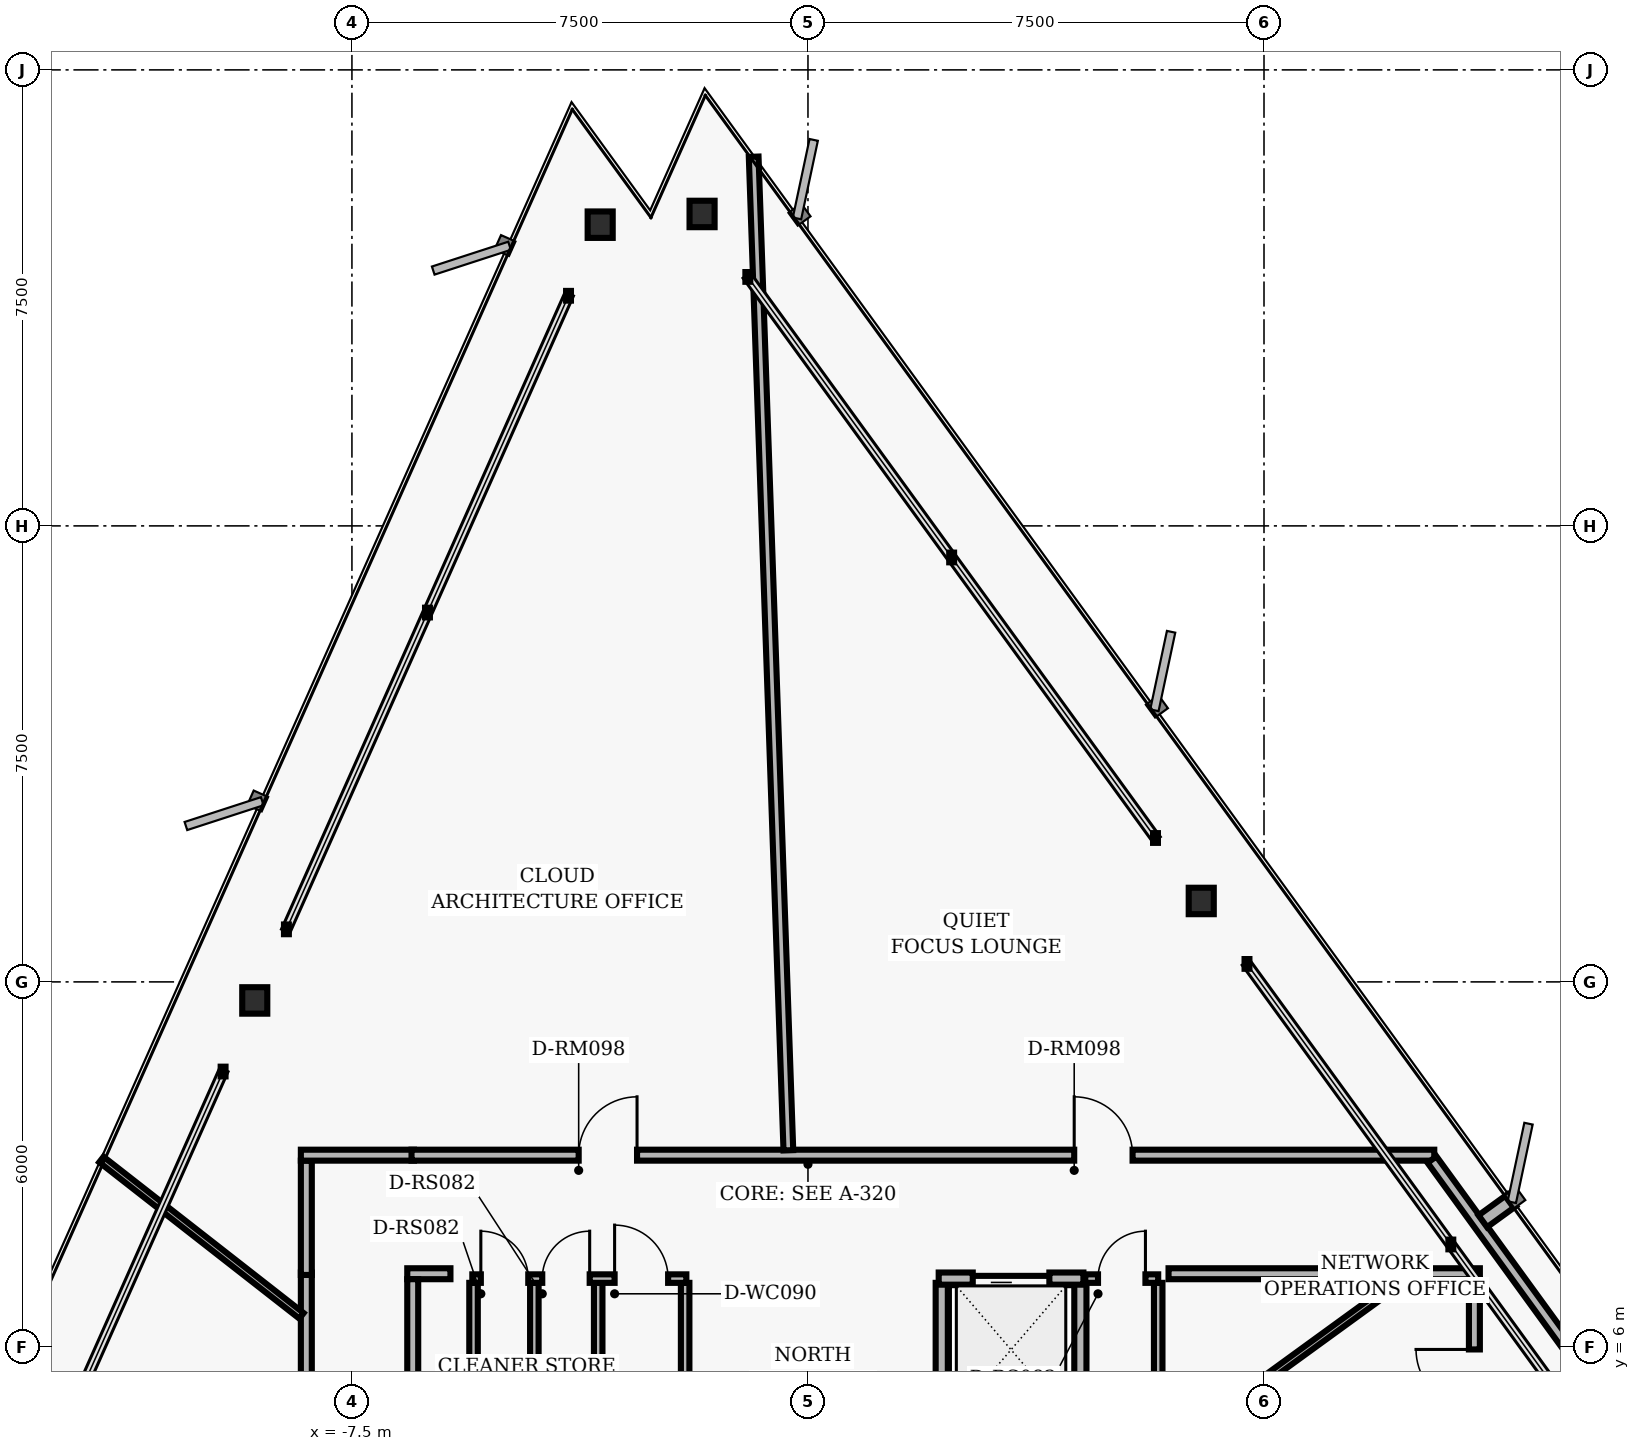
"""IFC4 building model, lengths in metres.
Left out: names, types, materials, properties, quantities, classifications, styles, units other than length and angle.
Written with IfcOpenShell. Run it as: python <this file> out.ifc"""

import sys

from ifc_helpers import new_model, si_unit, direction, frame, frame_2d, origin, origin_2d, place, context, subcontext, project, spatial, rectangle, i_section, extrude, element, fill, save


model = new_model("IFC4")
c1 = context("Model", 3, precision=1e-05, world=origin(), true_north=direction((0.0, 1.0)))
c2 = subcontext(c1, "Body", "Model", "MODEL_VIEW")
j1 = project(units=[si_unit("LENGTHUNIT", "METRE"), si_unit("PLANEANGLEUNIT", "RADIAN")], contexts=[c1])
p1 = place(None, origin())
s1 = spatial("IfcSite", under=j1, at=p1, CompositionType="ELEMENT")
p2 = place(p1, origin())
s2 = spatial("IfcBuilding", under=s1, at=p2, CompositionType="ELEMENT")
p3 = place(p2, frame((0.0, 0.0, 107.68)))
s3 = spatial("IfcBuildingStorey", under=s2, at=p3, CompositionType="ELEMENT", Elevation=107.68)
for number, where, z_axis, x_axis in (
    (1, (6.468, 13.331, 0.0), (0.0, 0.0, 1.0), (1.0, 0.0, 0.0)),
    (2, (-1.742, 24.63, 0.0), (0.0, 0.0, 1.0), (1.0, 0.0, 0.0)),
    (3, (-3.417, 24.454, 0.0), (0.0, 0.0, 1.0), (1.0, 0.0, 0.0)),
    (4, (-9.098, 11.695, 0.0), (0.0, 0.0, 1.0), (1.0, 0.0, 0.0)),
):
    element("IfcColumn", number, at=place(p3, frame(where, z_axis=z_axis, x_axis=x_axis)), inside=s3, PredefinedType="COLUMN", context=c2, shape_type="SweptSolid", body=[
        extrude(i_section(OverallWidth=0.412, OverallDepth=0.435, WebThickness=0.036, FlangeThickness=0.057, FilletRadius=0.022, at=origin_2d()), origin(), (0.0, 0.0, 1.0), 3.04),
    ])
p4 = place(p3, frame((2.2, 4.95, 0.0), z_axis=(0.0, 0.0, 1.0), x_axis=(0.0, 1.0, 0.0)))
e5 = element("IfcWall", 5, at=p4, inside=s3, PredefinedType="PARTITIONING", context=c2, shape_type="SweptSolid", body=[
    extrude(rectangle(XDim=2.1, YDim=0.2, at=frame_2d((1.05, 0.0))), origin(), (0.0, 0.0, 1.0), 2.132),
])
p5 = place(p3, frame((4.48, 4.95, 0.0), z_axis=(0.0, 0.0, 1.0), x_axis=(0.0, 1.0, 0.0)))
e6 = element("IfcWall", 6, at=p5, inside=s3, PredefinedType="PARTITIONING", context=c2, shape_type="SweptSolid", body=[
    extrude(rectangle(XDim=2.1, YDim=0.2, at=frame_2d((1.05, 0.0))), origin(), (0.0, 0.0, 1.0), 2.763),
])
p6 = place(p3, frame((2.15, 7.12, 0.0), z_axis=(0.0, 0.0, 1.0), x_axis=(1.0, 0.0, 0.0)))
e7 = element("IfcWall", 7, at=p6, inside=s3, PredefinedType="PARTITIONING", context=c2, shape_type="SweptSolid", body=[
    extrude(rectangle(XDim=2.38, YDim=0.2, at=frame_2d((1.19, 0.0))), origin(), (0.0, 0.0, 1.0), 2.763),
])
p7 = place(p6, frame((0.56, 0.0, 0.0)))
e8 = element("IfcOpeningElement", 8, at=p7, cuts=e7, PredefinedType="OPENING", context=c2, shape_type="SweptSolid", body=[
    extrude(rectangle(XDim=1.26, YDim=2.06, at=frame_2d((0.63, 1.03))), frame((0.0, 0.11, 0.0), z_axis=(0.0, -1.0, 0.0), x_axis=(1.0, 0.0, 0.0)), (0.0, 0.0, 1.0), 0.22),
])
for number, where, z_axis, x_axis in (
    (9, (-5.5, 4.95, 0.0), (0.0, 0.0, 1.0), (0.0, 1.0, 0.0)),
    (10, (-4.5, 4.95, 0.0), (0.0, 0.0, 1.0), (0.0, 1.0, 0.0)),
    (11, (-3.45, 4.95, 0.0), (0.0, 0.0, 1.0), (0.0, 1.0, 0.0)),
    (12, (-2.02, 4.95, 0.0), (0.0, 0.0, 1.0), (0.0, 1.0, 0.0)),
):
    element("IfcWall", number, at=place(p3, frame(where, z_axis=z_axis, x_axis=x_axis)), inside=s3, PredefinedType="PARTITIONING", context=c2, shape_type="SweptSolid", body=[
        extrude(rectangle(XDim=2.1, YDim=0.14, at=frame_2d((1.05, 0.0))), origin(), (0.0, 0.0, 1.0), 2.763),
    ])
p8 = place(p3, frame((-5.52, 7.12, 0.0), z_axis=(0.0, 0.0, 1.0), x_axis=(1.0, 0.0, 0.0)))
e13 = element("IfcWall", 13, at=p8, inside=s3, PredefinedType="PARTITIONING", context=c2, shape_type="SweptSolid", body=[
    extrude(rectangle(XDim=3.52, YDim=0.14, at=frame_2d((1.76, 0.0))), origin(), (0.0, 0.0, 1.0), 2.763),
])
p9 = place(p8, frame((0.14, 0.0, 0.0)))
e14 = element("IfcOpeningElement", 14, at=p9, cuts=e13, PredefinedType="OPENING", context=c2, shape_type="SweptSolid", body=[
    extrude(rectangle(XDim=0.78, YDim=2.01, at=frame_2d((0.39, 1.005))), frame((0.0, 0.08, 0.0), z_axis=(0.0, -1.0, 0.0), x_axis=(1.0, 0.0, 0.0)), (0.0, 0.0, 1.0), 0.16),
])
p10 = place(p8, frame((1.15, 0.0, 0.0)))
e15 = element("IfcOpeningElement", 15, at=p10, cuts=e13, PredefinedType="OPENING", context=c2, shape_type="SweptSolid", body=[
    extrude(rectangle(XDim=0.78, YDim=2.01, at=frame_2d((0.39, 1.005))), frame((0.0, 0.08, 0.0), z_axis=(0.0, -1.0, 0.0), x_axis=(1.0, 0.0, 0.0)), (0.0, 0.0, 1.0), 0.16),
])
p11 = place(p8, frame((2.34, 0.0, 0.0)))
e16 = element("IfcOpeningElement", 16, at=p11, cuts=e13, PredefinedType="OPENING", context=c2, shape_type="SweptSolid", body=[
    extrude(rectangle(XDim=0.88, YDim=2.02, at=frame_2d((0.44, 1.01))), frame((0.0, 0.08, 0.0), z_axis=(0.0, -1.0, 0.0), x_axis=(1.0, 0.0, 0.0)), (0.0, 0.0, 1.0), 0.16),
])
p12 = place(p3, frame((5.76, 4.95, 0.0), z_axis=(0.0, 0.0, 1.0), x_axis=(0.0, 1.0, 0.0)))
e17 = element("IfcWall", 17, at=p12, inside=s3, PredefinedType="PARTITIONING", context=c2, shape_type="SweptSolid", body=[
    extrude(rectangle(XDim=2.1, YDim=0.14, at=frame_2d((1.05, 0.0))), origin(), (0.0, 0.0, 1.0), 2.132),
])
p13 = place(p3, frame((4.56, 7.12, 0.0), z_axis=(0.0, 0.0, 1.0), x_axis=(1.0, 0.0, 0.0)))
e18 = element("IfcWall", 18, at=p13, inside=s3, PredefinedType="PARTITIONING", context=c2, shape_type="SweptSolid", body=[
    extrude(rectangle(XDim=1.2, YDim=0.14, at=frame_2d((0.6, 0.0))), origin(), (0.0, 0.0, 1.0), 2.763),
])
p14 = place(p13, frame((0.21, 0.0, 0.0)))
e19 = element("IfcOpeningElement", 19, at=p14, cuts=e18, PredefinedType="OPENING", context=c2, shape_type="SweptSolid", body=[
    extrude(rectangle(XDim=0.78, YDim=2.01, at=frame_2d((0.39, 1.005))), frame((0.0, 0.08, 0.0), z_axis=(0.0, -1.0, 0.0), x_axis=(1.0, 0.0, 0.0)), (0.0, 0.0, 1.0), 0.16),
])
p15 = place(p3, frame((-8.25, -7.22, 0.0), z_axis=(0.0, 0.0, 1.0), x_axis=(0.0, 1.0, 0.0)))
e20 = element("IfcWall", 20, at=p15, inside=s3, PredefinedType="PARTITIONING", context=c2, shape_type="SweptSolid", body=[
    extrude(rectangle(XDim=14.44, YDim=0.18, at=frame_2d((7.22, 0.0))), origin(), (0.0, 0.0, 1.0), 2.33),
])
p16 = place(p15, frame((3.038, 0.0, 0.0)))
e21 = element("IfcOpeningElement", 21, at=p16, cuts=e20, PredefinedType="OPENING", context=c2, shape_type="SweptSolid", body=[
    extrude(rectangle(XDim=0.96, YDim=2.02, at=frame_2d((0.48, 1.01))), frame((0.0, 0.1, 0.0), z_axis=(0.0, -1.0, 0.0), x_axis=(1.0, 0.0, 0.0)), (0.0, 0.0, 1.0), 0.2),
])
p17 = place(p15, frame((9.456, 0.0, 0.0)))
e22 = element("IfcOpeningElement", 22, at=p17, cuts=e20, PredefinedType="OPENING", context=c2, shape_type="SweptSolid", body=[
    extrude(rectangle(XDim=1.18, YDim=2.02, at=frame_2d((0.59, 1.01))), frame((0.0, 0.1, 0.0), z_axis=(0.0, -1.0, 0.0), x_axis=(1.0, 0.0, 0.0)), (0.0, 0.0, 1.0), 0.2),
])
p18 = place(p3, frame((-8.25, 7.18, 0.0), z_axis=(0.0, 0.0, 1.0), x_axis=(0.0, 1.0, 0.0)))
e23 = element("IfcWall", 23, at=p18, inside=s3, PredefinedType="PARTITIONING", context=c2, shape_type="SweptSolid", body=[
    extrude(rectangle(XDim=1.88, YDim=0.18, at=frame_2d((0.94, 0.0))), origin(), (0.0, 0.0, 1.0), 2.763),
])
p19 = place(p3, frame((-8.34, 9.15, 0.0), z_axis=(0.0, 0.0, 1.0), x_axis=(1.0, 0.0, 0.0)))
e24 = element("IfcWall", 24, at=p19, inside=s3, PredefinedType="PARTITIONING", context=c2, shape_type="SweptSolid", body=[
    extrude(rectangle(XDim=1.86, YDim=0.18, at=frame_2d((0.93, 0.0))), origin(), (0.0, 0.0, 1.0), 2.763),
])
p20 = place(p3, frame((-6.52, 9.15, 0.0), z_axis=(0.0, 0.0, 1.0), x_axis=(1.0, 0.0, 0.0)))
e25 = element("IfcWall", 25, at=p20, inside=s3, PredefinedType="PARTITIONING", context=c2, shape_type="SweptSolid", body=[
    extrude(rectangle(XDim=16.82, YDim=0.18, at=frame_2d((8.41, 0.0))), origin(), (0.0, 0.0, 1.0), 2.763),
])
p21 = place(p20, frame((10.898, 0.0, 0.0)))
e26 = element("IfcOpeningElement", 26, at=p21, cuts=e25, PredefinedType="OPENING", context=c2, shape_type="SweptSolid", body=[
    extrude(rectangle(XDim=0.96, YDim=2.02, at=frame_2d((0.48, 1.01))), frame((0.0, 0.1, 0.0), z_axis=(0.0, -1.0, 0.0), x_axis=(1.0, 0.0, 0.0)), (0.0, 0.0, 1.0), 0.2),
])
p22 = place(p20, frame((2.749, 0.0, 0.0)))
e27 = element("IfcOpeningElement", 27, at=p22, cuts=e25, PredefinedType="OPENING", context=c2, shape_type="SweptSolid", body=[
    extrude(rectangle(XDim=0.96, YDim=2.02, at=frame_2d((0.48, 1.01))), frame((0.0, 0.1, 0.0), z_axis=(0.0, -1.0, 0.0), x_axis=(1.0, 0.0, 0.0)), (0.0, 0.0, 1.0), 0.2),
])
p23 = place(p3, frame((10.263, 9.077, 0.0), z_axis=(0.0, 0.0, 1.0), x_axis=(0.587780951295, -0.809020119215, 0.0)))
e28 = element("IfcWall", 28, at=p23, inside=s3, PredefinedType="PARTITIONING", context=c2, shape_type="SweptSolid", body=[
    extrude(rectangle(XDim=7.469, YDim=0.18, at=frame_2d((3.734, 0.0))), origin(), (0.0, 0.0, 1.0), 2.763),
])
p24 = place(p3, frame((10.96, 3.84, 0.0), z_axis=(0.0, 0.0, 1.0), x_axis=(0.0, 1.0, 0.0)))
e29 = element("IfcWall", 29, at=p24, inside=s3, PredefinedType="PARTITIONING", context=c2, shape_type="SweptSolid", body=[
    extrude(rectangle(XDim=3.271, YDim=0.18, at=frame_2d((1.635, 0.0))), origin(), (0.0, 0.0, 1.0), 2.763),
])
p25 = place(p24, frame((1.155, 0.0, 0.0)))
e30 = element("IfcOpeningElement", 30, at=p25, cuts=e29, PredefinedType="OPENING", context=c2, shape_type="SweptSolid", body=[
    extrude(rectangle(XDim=0.96, YDim=2.02, at=frame_2d((0.48, 1.01))), frame((0.0, 0.1, 0.0), z_axis=(0.0, -1.0, 0.0), x_axis=(1.0, 0.0, 0.0)), (0.0, 0.0, 1.0), 0.2),
])
p26 = place(p3, frame((11.05, 7.2, 0.0), z_axis=(0.0, 0.0, 1.0), x_axis=(-1.0, 0.0, 0.0)))
e31 = element("IfcWall", 31, at=p26, inside=s3, PredefinedType="PARTITIONING", context=c2, shape_type="SweptSolid", body=[
    extrude(rectangle(XDim=5.12, YDim=0.18, at=frame_2d((2.56, 0.0))), origin(), (0.0, 0.0, 1.0), 2.763),
])
p27 = place(p3, frame((-5.88, 7.2, 0.0), z_axis=(0.0, 0.0, 1.0), x_axis=(-1.0, 0.0, 0.0)))
e32 = element("IfcWall", 32, at=p27, inside=s3, PredefinedType="PARTITIONING", context=c2, shape_type="SweptSolid", body=[
    extrude(rectangle(XDim=0.71, YDim=0.18, at=frame_2d((0.355, 0.0))), origin(), (0.0, 0.0, 1.0), 2.763),
])
p28 = place(p3, frame((-6.5, 7.11, 0.0), z_axis=(0.0, 0.0, 1.0), x_axis=(0.0, -1.0, 0.0)))
e33 = element("IfcWall", 33, at=p28, inside=s3, PredefinedType="PARTITIONING", context=c2, shape_type="SweptSolid", body=[
    extrude(rectangle(XDim=2.058, YDim=0.18, at=frame_2d((1.029, 0.0))), origin(), (0.0, 0.0, 1.0), 2.763),
])
p29 = place(p3, frame((6.758, 4.91, 0.0), z_axis=(0.0, 0.0, 1.0), x_axis=(0.808985911181, 0.58782803226, 0.0)))
e34 = element("IfcWall", 34, at=p29, inside=s3, PredefinedType="MOVABLE", context=c2, shape_type="SweptSolid", body=[
    extrude(rectangle(XDim=3.76, YDim=0.115, at=frame_2d((1.88, 0.0))), origin(), (0.0, 0.0, 1.0), 2.763),
])
p30 = place(p3, frame((11.098, 8.063, 0.0), z_axis=(0.0, 0.0, 1.0), x_axis=(0.809093866449, 0.587679432408, 0.0)))
e35 = element("IfcWall", 35, at=p30, inside=s3, PredefinedType="PARTITIONING", context=c2, shape_type="SweptSolid", body=[
    extrude(rectangle(XDim=0.59, YDim=0.24, at=frame_2d((0.295, 0.0))), origin(), (0.0, 0.0, 1.0), 2.763),
])
p31 = place(p3, frame((-0.322, 9.23, 0.0), z_axis=(0.0, 0.0, 1.0), x_axis=(-0.034907078812, 0.999390562217, 0.0)))
e36 = element("IfcWall", 36, at=p31, inside=s3, PredefinedType="PARTITIONING", context=c2, shape_type="SweptSolid", body=[
    extrude(rectangle(XDim=16.352, YDim=0.16, at=frame_2d((8.176, 0.0))), origin(), (0.0, 0.0, 1.0), 2.132),
])
p32 = place(p3, frame((-8.33, 6.508, 0.0), z_axis=(0.0, 0.0, 1.0), x_axis=(-0.787993347372, 0.615683753641, 0.0)))
e37 = element("IfcWall", 37, at=p32, inside=s3, PredefinedType="MOVABLE", context=c2, shape_type="SweptSolid", body=[
    extrude(rectangle(XDim=4.176, YDim=0.115, at=frame_2d((2.088, 0.0))), origin(), (0.0, 0.0, 1.0), 2.763),
])
p33 = place(p7, origin())
e38 = element("IfcDoor", 38, at=p33, inside=s3, OperationType="SLIDING_TO_LEFT", PredefinedType="DOOR", context=c2, shape_type="SweptSolid", body=[
    extrude(rectangle(XDim=1.26, YDim=2.06, at=frame_2d((0.63, 1.03))), frame((0.0, 0.025, 0.0), z_axis=(0.0, -1.0, 0.0), x_axis=(1.0, 0.0, 0.0)), (0.0, 0.0, 1.0), 0.05),
])
fill(e8, e38)
p34 = place(p9, origin())
e39 = element("IfcDoor", 39, at=p34, inside=s3, OperationType="SINGLE_SWING_LEFT", PredefinedType="DOOR", context=c2, shape_type="SweptSolid", body=[
    extrude(rectangle(XDim=0.78, YDim=2.01, at=frame_2d((0.39, 1.005))), frame((0.0, 0.025, 0.0), z_axis=(0.0, -1.0, 0.0), x_axis=(1.0, 0.0, 0.0)), (0.0, 0.0, 1.0), 0.05),
])
fill(e14, e39)
p35 = place(p10, origin())
e40 = element("IfcDoor", 40, at=p35, inside=s3, OperationType="SINGLE_SWING_RIGHT", PredefinedType="DOOR", context=c2, shape_type="SweptSolid", body=[
    extrude(rectangle(XDim=0.78, YDim=2.01, at=frame_2d((0.39, 1.005))), frame((0.0, 0.025, 0.0), z_axis=(0.0, -1.0, 0.0), x_axis=(1.0, 0.0, 0.0)), (0.0, 0.0, 1.0), 0.05),
])
fill(e15, e40)
p36 = place(p11, origin())
e41 = element("IfcDoor", 41, at=p36, inside=s3, OperationType="SINGLE_SWING_LEFT", PredefinedType="DOOR", context=c2, shape_type="SweptSolid", body=[
    extrude(rectangle(XDim=0.88, YDim=2.02, at=frame_2d((0.44, 1.01))), frame((0.0, 0.025, 0.0), z_axis=(0.0, -1.0, 0.0), x_axis=(1.0, 0.0, 0.0)), (0.0, 0.0, 1.0), 0.05),
])
fill(e16, e41)
p37 = place(p14, origin())
e42 = element("IfcDoor", 42, at=p37, inside=s3, OperationType="SINGLE_SWING_RIGHT", PredefinedType="DOOR", context=c2, shape_type="SweptSolid", body=[
    extrude(rectangle(XDim=0.78, YDim=2.01, at=frame_2d((0.39, 1.005))), frame((0.0, 0.025, 0.0), z_axis=(0.0, -1.0, 0.0), x_axis=(1.0, 0.0, 0.0)), (0.0, 0.0, 1.0), 0.05),
])
fill(e19, e42)
p38 = place(p25, origin())
e43 = element("IfcDoor", 43, at=p38, inside=s3, OperationType="SINGLE_SWING_RIGHT", PredefinedType="DOOR", context=c2, shape_type="SweptSolid", body=[
    extrude(rectangle(XDim=0.96, YDim=2.02, at=frame_2d((0.48, 1.01))), frame((0.0, 0.025, 0.0), z_axis=(0.0, -1.0, 0.0), x_axis=(1.0, 0.0, 0.0)), (0.0, 0.0, 1.0), 0.05),
])
fill(e30, e43)
p39 = place(p21, origin())
e44 = element("IfcDoor", 44, at=p39, inside=s3, OperationType="SINGLE_SWING_LEFT", PredefinedType="DOOR", context=c2, shape_type="SweptSolid", body=[
    extrude(rectangle(XDim=0.96, YDim=2.02, at=frame_2d((0.48, 1.01))), frame((0.0, 0.025, 0.0), z_axis=(0.0, -1.0, 0.0), x_axis=(1.0, 0.0, 0.0)), (0.0, 0.0, 1.0), 0.05),
])
fill(e26, e44)
p40 = place(p22, origin())
e45 = element("IfcDoor", 45, at=p40, inside=s3, OperationType="SINGLE_SWING_RIGHT", PredefinedType="DOOR", context=c2, shape_type="SweptSolid", body=[
    extrude(rectangle(XDim=0.96, YDim=2.02, at=frame_2d((0.48, 1.01))), frame((0.0, 0.025, 0.0), z_axis=(0.0, -1.0, 0.0), x_axis=(1.0, 0.0, 0.0)), (0.0, 0.0, 1.0), 0.05),
])
fill(e27, e45)
save(model, sys.argv[1])
